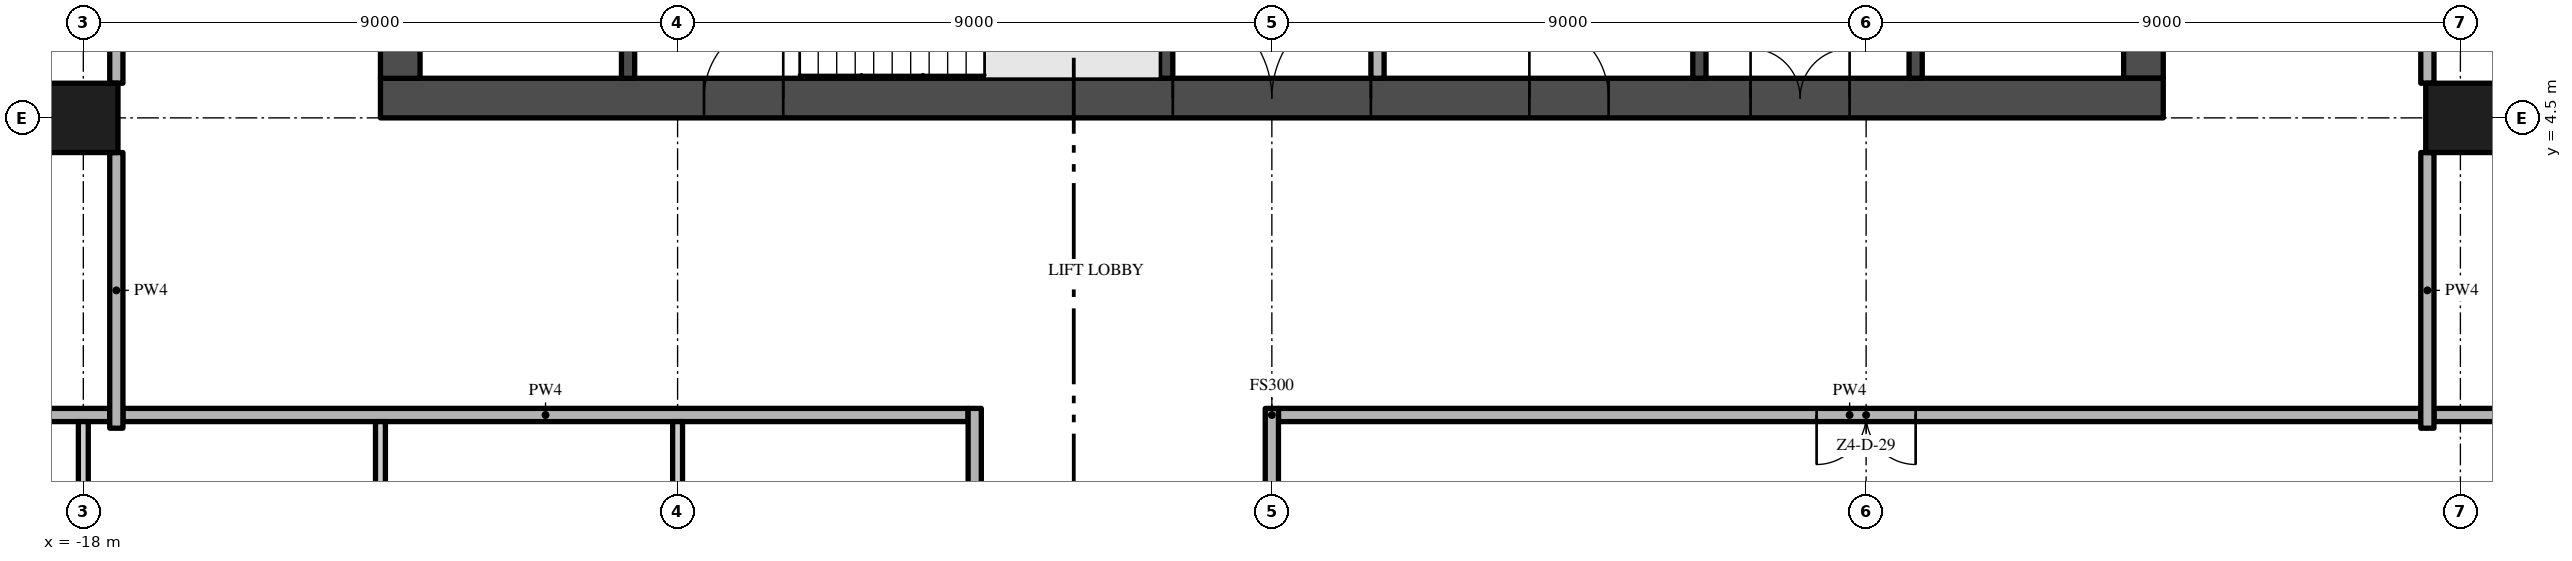
"""IFC4 building model, lengths in metres.
Left out: names, types, materials, properties, quantities, classifications, styles, units other than length and angle.
Written with IfcOpenShell. Run it as: python <this file> out.ifc"""

import sys

from ifc_helpers import new_model, si_unit, direction, frame, frame_2d, origin, origin_2d, place, context, subcontext, project, spatial, rectangle, extrude, element, fill, save


model = new_model("IFC4")
c1 = context("Model", 3, precision=1e-05, world=origin(), true_north=direction((0.0, 1.0)))
c2 = subcontext(c1, "Body", "Model", "MODEL_VIEW")
j1 = project(units=[si_unit("LENGTHUNIT", "METRE"), si_unit("PLANEANGLEUNIT", "RADIAN")], contexts=[c1])
p1 = place(None, origin())
s1 = spatial("IfcSite", under=j1, at=p1, CompositionType="ELEMENT")
p2 = place(p1, origin())
s2 = spatial("IfcBuilding", under=s1, at=p2, CompositionType="ELEMENT")
p3 = place(p2, frame((0.0, 0.0, 218.6)))
s3 = spatial("IfcBuildingStorey", under=s2, at=p3, CompositionType="ELEMENT", Elevation=218.6)
p4 = place(p3, frame((-13.5, 4.8, -0.3), z_axis=(0.0, 0.0, 1.0), x_axis=(1.0, 0.0, 0.0)))
e1 = element("IfcWall", 1, at=p4, inside=s3, PredefinedType="SHEAR", context=c2, shape_type="SweptSolid", body=[
    extrude(rectangle(XDim=27.0, YDim=0.6, at=frame_2d((13.5, 0.0))), origin(), (0.0, 0.0, 1.0), 3.8),
])
p5 = place(p4, frame((12.0, 0.0, 0.3)))
e2 = element("IfcOpeningElement", 2, at=p5, cuts=e1, PredefinedType="OPENING", context=c2, shape_type="SweptSolid", body=[
    extrude(rectangle(XDim=3.0, YDim=2.4, at=frame_2d((1.5, 1.2))), frame((0.0, 0.31, 0.0), z_axis=(0.0, -1.0, 0.0), x_axis=(1.0, 0.0, 0.0)), (0.0, 0.0, 1.0), 0.62),
])
p6 = place(p4, frame((4.9, 0.0, 0.3)))
e3 = element("IfcOpeningElement", 3, at=p6, cuts=e1, PredefinedType="OPENING", context=c2, shape_type="SweptSolid", body=[
    extrude(rectangle(XDim=1.2, YDim=2.2, at=frame_2d((0.6, 1.1))), frame((0.0, 0.31, 0.0), z_axis=(0.0, -1.0, 0.0), x_axis=(1.0, 0.0, 0.0)), (0.0, 0.0, 1.0), 0.62),
])
p7 = place(p4, frame((20.75, 0.0, 0.3)))
e4 = element("IfcOpeningElement", 4, at=p7, cuts=e1, PredefinedType="OPENING", context=c2, shape_type="SweptSolid", body=[
    extrude(rectangle(XDim=1.5, YDim=2.2, at=frame_2d((0.75, 1.1))), frame((0.0, 0.31, 0.0), z_axis=(0.0, -1.0, 0.0), x_axis=(1.0, 0.0, 0.0)), (0.0, 0.0, 1.0), 0.62),
])
p8 = place(p4, frame((17.4, 0.0, 0.3)))
e5 = element("IfcOpeningElement", 5, at=p8, cuts=e1, PredefinedType="OPENING", context=c2, shape_type="SweptSolid", body=[
    extrude(rectangle(XDim=1.2, YDim=2.2, at=frame_2d((0.6, 1.1))), frame((0.0, 0.31, 0.0), z_axis=(0.0, -1.0, 0.0), x_axis=(1.0, 0.0, 0.0)), (0.0, 0.0, 1.0), 0.62),
])
p9 = place(p3, frame((13.2, 5.1, -0.3), z_axis=(0.0, 0.0, 1.0), x_axis=(0.0, 1.0, 0.0)))
e6 = element("IfcWall", 6, at=p9, inside=s3, PredefinedType="SHEAR", context=c2, shape_type="SweptSolid", body=[
    extrude(rectangle(XDim=16.8, YDim=0.6, at=frame_2d((8.4, 0.0))), origin(), (0.0, 0.0, 1.0), 3.8),
])
p10 = place(p9, frame((6.3, 0.0, 0.3)))
e7 = element("IfcOpeningElement", 7, at=p10, cuts=e6, PredefinedType="OPENING", context=c2, shape_type="SweptSolid", body=[
    extrude(rectangle(XDim=1.2, YDim=2.2, at=frame_2d((0.6, 1.1))), frame((0.0, 0.31, 0.0), z_axis=(0.0, -1.0, 0.0), x_axis=(1.0, 0.0, 0.0)), (0.0, 0.0, 1.0), 0.62),
])
p11 = place(p3, frame((-13.2, 21.9, -0.3), z_axis=(0.0, 0.0, 1.0), x_axis=(0.0, -1.0, 0.0)))
e8 = element("IfcWall", 8, at=p11, inside=s3, PredefinedType="SHEAR", context=c2, shape_type="SweptSolid", body=[
    extrude(rectangle(XDim=16.8, YDim=0.6, at=frame_2d((8.4, 0.0))), origin(), (0.0, 0.0, 1.0), 3.8),
])
p12 = place(p11, frame((9.3, 0.0, 0.3)))
e9 = element("IfcOpeningElement", 9, at=p12, cuts=e8, PredefinedType="OPENING", context=c2, shape_type="SweptSolid", body=[
    extrude(rectangle(XDim=1.2, YDim=2.2, at=frame_2d((0.6, 1.1))), frame((0.0, 0.31, 0.0), z_axis=(0.0, -1.0, 0.0), x_axis=(1.0, 0.0, 0.0)), (0.0, 0.0, 1.0), 0.62),
])
for number, where, z_axis, x_axis in (
    (10, (-18.0, 4.5, 0.0), (0.0, 0.0, 1.0), (1.0, 0.0, 0.0)),
    (11, (18.0, 4.5, 0.0), (0.0, 0.0, 1.0), (1.0, 0.0, 0.0)),
):
    element("IfcColumn", number, at=place(p3, frame(where, z_axis=z_axis, x_axis=x_axis)), inside=s3, PredefinedType="COLUMN", context=c2, shape_type="SweptSolid", body=[
        extrude(rectangle(XDim=1.05, YDim=1.05, at=origin_2d()), origin(), (0.0, 0.0, 1.0), 3.5),
    ])
for number, where, z_axis, x_axis in (
    (12, (-9.75, 5.1, 0.0), (0.0, 0.0, 1.0), (0.0, 1.0, 0.0)),
    (13, (-1.6, 5.1, 0.0), (0.0, 0.0, 1.0), (0.0, 1.0, 0.0)),
):
    element("IfcWall", number, at=place(p3, frame(where, z_axis=z_axis, x_axis=x_axis)), inside=s3, PredefinedType="SHEAR", context=c2, shape_type="SweptSolid", body=[
        extrude(rectangle(XDim=2.85, YDim=0.2, at=frame_2d((1.425, 0.0))), origin(), (0.0, 0.0, 1.0), 3.5),
    ])
p13 = place(p3, frame((1.6, 7.5, 0.0), z_axis=(0.0, 0.0, 1.0), x_axis=(0.0, -1.0, 0.0)))
e14 = element("IfcWall", 14, at=p13, inside=s3, PredefinedType="PARTITIONING", context=c2, shape_type="SweptSolid", body=[
    extrude(rectangle(XDim=2.4, YDim=0.2, at=frame_2d((1.2, 0.0))), origin(), (0.0, 0.0, 1.0), 3.5),
])
p14 = place(p13, frame((0.35, 0.0, 0.0)))
e15 = element("IfcOpeningElement", 15, at=p14, cuts=e14, PredefinedType="OPENING", context=c2, shape_type="SweptSolid", body=[
    extrude(rectangle(XDim=0.9, YDim=2.1, at=frame_2d((0.45, 1.05))), frame((0.0, 0.11, 0.0), z_axis=(0.0, -1.0, 0.0), x_axis=(1.0, 0.0, 0.0)), (0.0, 0.0, 1.0), 0.22),
])
p15 = place(p3, frame((6.475, 5.1, 0.0), z_axis=(0.0, 0.0, 1.0), x_axis=(0.0, 1.0, 0.0)))
e16 = element("IfcWall", 16, at=p15, inside=s3, PredefinedType="SHEAR", context=c2, shape_type="SweptSolid", body=[
    extrude(rectangle(XDim=2.4, YDim=0.2, at=frame_2d((1.2, 0.0))), origin(), (0.0, 0.0, 1.0), 3.5),
])
p16 = place(p3, frame((9.75, 5.1, 0.0), z_axis=(0.0, 0.0, 1.0), x_axis=(0.0, 1.0, 0.0)))
e17 = element("IfcWall", 17, at=p16, inside=s3, PredefinedType="SHEAR", context=c2, shape_type="SweptSolid", body=[
    extrude(rectangle(XDim=2.5, YDim=0.2, at=frame_2d((1.25, 0.0))), origin(), (0.0, 0.0, 1.0), 3.5),
])
p17 = place(p16, frame((0.85, 0.0, 0.0)))
e18 = element("IfcOpeningElement", 18, at=p17, cuts=e17, PredefinedType="OPENING", context=c2, shape_type="SweptSolid", body=[
    extrude(rectangle(XDim=1.1, YDim=2.1, at=frame_2d((0.55, 1.05))), frame((0.0, 0.11, 0.0), z_axis=(0.0, -1.0, 0.0), x_axis=(1.0, 0.0, 0.0)), (0.0, 0.0, 1.0), 0.22),
])
p18 = place(p3, frame((-17.4, 0.0, 0.0), z_axis=(0.0, 0.0, 1.0), x_axis=(1.0, 0.0, 0.0)))
e19 = element("IfcWall", 19, at=p18, inside=s3, PredefinedType="PARTITIONING", context=c2, shape_type="SweptSolid", body=[
    extrude(rectangle(XDim=12.8, YDim=0.2, at=frame_2d((6.4, 0.0))), origin(), (0.0, 0.0, 1.0), 3.5),
])
p19 = place(p3, frame((17.4, 0.0, 0.0), z_axis=(0.0, 0.0, 1.0), x_axis=(-1.0, 0.0, 0.0)))
e20 = element("IfcWall", 20, at=p19, inside=s3, PredefinedType="PARTITIONING", context=c2, shape_type="SweptSolid", body=[
    extrude(rectangle(XDim=17.3, YDim=0.2, at=frame_2d((8.65, 0.0))), origin(), (0.0, 0.0, 1.0), 3.5),
])
p20 = place(p19, frame((7.65, 0.0, 0.0)))
e21 = element("IfcOpeningElement", 21, at=p20, cuts=e20, PredefinedType="OPENING", context=c2, shape_type="SweptSolid", body=[
    extrude(rectangle(XDim=1.5, YDim=2.4, at=frame_2d((0.75, 1.2))), frame((0.0, 0.11, 0.0), z_axis=(0.0, -1.0, 0.0), x_axis=(1.0, 0.0, 0.0)), (0.0, 0.0, 1.0), 0.22),
])
for number, where, z_axis, x_axis in (
    (22, (-26.7, 0.0, 0.0), (0.0, 0.0, 1.0), (1.0, 0.0, 0.0)),
    (23, (17.6, 0.0, 0.0), (0.0, 0.0, 1.0), (1.0, 0.0, 0.0)),
):
    element("IfcWall", number, at=place(p3, frame(where, z_axis=z_axis, x_axis=x_axis)), inside=s3, PredefinedType="PARTITIONING", context=c2, shape_type="SweptSolid", body=[
        extrude(rectangle(XDim=9.1, YDim=0.2, at=frame_2d((4.55, 0.0))), origin(), (0.0, 0.0, 1.0), 3.5),
    ])
p21 = place(p3, frame((-18.0, -3.975, 0.0), z_axis=(0.0, 0.0, 1.0), x_axis=(0.0, 1.0, 0.0)))
e24 = element("IfcWall", 24, at=p21, inside=s3, PredefinedType="PARTITIONING", context=c2, shape_type="SweptSolid", body=[
    extrude(rectangle(XDim=3.875, YDim=0.15, at=frame_2d((1.938, 0.0))), origin(), (0.0, 0.0, 1.0), 3.5),
])
p22 = place(p21, frame((1.0, 0.0, 0.0)))
e25 = element("IfcOpeningElement", 25, at=p22, cuts=e24, PredefinedType="OPENING", context=c2, shape_type="SweptSolid", body=[
    extrude(rectangle(XDim=1.5, YDim=2.4, at=frame_2d((0.75, 1.2))), frame((0.0, 0.085, 0.0), z_axis=(0.0, -1.0, 0.0), x_axis=(1.0, 0.0, 0.0)), (0.0, 0.0, 1.0), 0.17),
])
p23 = place(p3, frame((-17.5, -0.2, 0.0), z_axis=(0.0, 0.0, 1.0), x_axis=(0.0, 1.0, 0.0)))
e26 = element("IfcWall", 26, at=p23, inside=s3, PredefinedType="PARTITIONING", context=c2, shape_type="SweptSolid", body=[
    extrude(rectangle(XDim=4.175, YDim=0.2, at=frame_2d((2.087, 0.0))), origin(), (0.0, 0.0, 1.0), 3.5),
])
p24 = place(p3, frame((-17.5, 5.025, 0.0), z_axis=(0.0, 0.0, 1.0), x_axis=(0.0, 1.0, 0.0)))
e27 = element("IfcWall", 27, at=p24, inside=s3, PredefinedType="PARTITIONING", context=c2, shape_type="SweptSolid", body=[
    extrude(rectangle(XDim=7.95, YDim=0.2, at=frame_2d((3.975, 0.0))), origin(), (0.0, 0.0, 1.0), 3.5),
])
p25 = place(p3, frame((-13.5, -0.1, 0.0), z_axis=(0.0, 0.0, 1.0), x_axis=(0.0, -1.0, 0.0)))
e28 = element("IfcWall", 28, at=p25, inside=s3, PredefinedType="PARTITIONING", context=c2, shape_type="SweptSolid", body=[
    extrude(rectangle(XDim=8.525, YDim=0.15, at=frame_2d((4.263, 0.0))), origin(), (0.0, 0.0, 1.0), 3.5),
])
p26 = place(p25, frame((4.0, 0.0, 0.0)))
e29 = element("IfcOpeningElement", 29, at=p26, cuts=e28, PredefinedType="OPENING", context=c2, shape_type="SweptSolid", body=[
    extrude(rectangle(XDim=0.8, YDim=2.0, at=frame_2d((0.4, 1.0))), frame((0.0, 0.085, 0.0), z_axis=(0.0, -1.0, 0.0), x_axis=(1.0, 0.0, 0.0)), (0.0, 0.0, 1.0), 0.17),
])
p27 = place(p3, frame((-9.0, -3.975, 0.0), z_axis=(0.0, 0.0, 1.0), x_axis=(0.0, 1.0, 0.0)))
e30 = element("IfcWall", 30, at=p27, inside=s3, PredefinedType="PARTITIONING", context=c2, shape_type="SweptSolid", body=[
    extrude(rectangle(XDim=3.875, YDim=0.15, at=frame_2d((1.938, 0.0))), origin(), (0.0, 0.0, 1.0), 3.5),
])
p28 = place(p27, frame((2.025, 0.0, 0.0)))
e31 = element("IfcOpeningElement", 31, at=p28, cuts=e30, PredefinedType="OPENING", context=c2, shape_type="SweptSolid", body=[
    extrude(rectangle(XDim=0.9, YDim=2.1, at=frame_2d((0.45, 1.05))), frame((0.0, 0.085, 0.0), z_axis=(0.0, -1.0, 0.0), x_axis=(1.0, 0.0, 0.0)), (0.0, 0.0, 1.0), 0.17),
])
p29 = place(p3, frame((-4.5, -22.2, 0.0), z_axis=(0.0, 0.0, 1.0), x_axis=(0.0, 1.0, 0.0)))
e32 = element("IfcWall", 32, at=p29, inside=s3, PredefinedType="PARTITIONING", context=c2, shape_type="SweptSolid", body=[
    extrude(rectangle(XDim=22.3, YDim=0.2, at=frame_2d((11.15, 0.0))), origin(), (0.0, 0.0, 1.0), 3.5),
])
p30 = place(p29, frame((10.2, 0.0, 0.0)))
e33 = element("IfcOpeningElement", 33, at=p30, cuts=e32, PredefinedType="OPENING", context=c2, shape_type="SweptSolid", body=[
    extrude(rectangle(XDim=1.5, YDim=2.4, at=frame_2d((0.75, 1.2))), frame((0.0, 0.11, 0.0), z_axis=(0.0, -1.0, 0.0), x_axis=(1.0, 0.0, 0.0)), (0.0, 0.0, 1.0), 0.22),
])
p31 = place(p3, frame((0.0, -3.975, 0.0), z_axis=(0.0, 0.0, 1.0), x_axis=(0.0, 1.0, 0.0)))
e34 = element("IfcWall", 34, at=p31, inside=s3, PredefinedType="PARTITIONING", context=c2, shape_type="SweptSolid", body=[
    extrude(rectangle(XDim=4.075, YDim=0.2, at=frame_2d((2.038, 0.0))), origin(), (0.0, 0.0, 1.0), 3.5),
])
p32 = place(p3, frame((17.5, -0.2, 0.0), z_axis=(0.0, 0.0, 1.0), x_axis=(0.0, 1.0, 0.0)))
e35 = element("IfcWall", 35, at=p32, inside=s3, PredefinedType="PARTITIONING", context=c2, shape_type="SweptSolid", body=[
    extrude(rectangle(XDim=4.175, YDim=0.2, at=frame_2d((2.087, 0.0))), origin(), (0.0, 0.0, 1.0), 3.5),
])
p33 = place(p3, frame((17.5, 5.025, 0.0), z_axis=(0.0, 0.0, 1.0), x_axis=(0.0, 1.0, 0.0)))
e36 = element("IfcWall", 36, at=p33, inside=s3, PredefinedType="PARTITIONING", context=c2, shape_type="SweptSolid", body=[
    extrude(rectangle(XDim=7.95, YDim=0.2, at=frame_2d((3.975, 0.0))), origin(), (0.0, 0.0, 1.0), 3.5),
])
p34 = place(p5, frame((3.0, 0.0, 0.0), z_axis=(0.0, 0.0, 1.0), x_axis=(-1.0, 0.0, 0.0)))
e37 = element("IfcDoor", 37, at=p34, inside=s3, OperationType="DOUBLE_DOOR_SINGLE_SWING", PredefinedType="DOOR", context=c2, shape_type="SweptSolid", body=[
    extrude(rectangle(XDim=3.0, YDim=2.4, at=frame_2d((1.5, 1.2))), frame((0.0, 0.025, 0.0), z_axis=(0.0, -1.0, 0.0), x_axis=(1.0, 0.0, 0.0)), (0.0, 0.0, 1.0), 0.05),
])
fill(e2, e37)
p35 = place(p6, frame((1.2, 0.0, 0.0), z_axis=(0.0, 0.0, 1.0), x_axis=(-1.0, 0.0, 0.0)))
e38 = element("IfcDoor", 38, at=p35, inside=s3, OperationType="SINGLE_SWING_LEFT", PredefinedType="DOOR", context=c2, shape_type="SweptSolid", body=[
    extrude(rectangle(XDim=1.2, YDim=2.2, at=frame_2d((0.6, 1.1))), frame((0.0, 0.025, 0.0), z_axis=(0.0, -1.0, 0.0), x_axis=(1.0, 0.0, 0.0)), (0.0, 0.0, 1.0), 0.05),
])
fill(e3, e38)
p36 = place(p7, frame((1.5, 0.0, 0.0), z_axis=(0.0, 0.0, 1.0), x_axis=(-1.0, 0.0, 0.0)))
e39 = element("IfcDoor", 39, at=p36, inside=s3, OperationType="DOUBLE_DOOR_SINGLE_SWING", PredefinedType="DOOR", context=c2, shape_type="SweptSolid", body=[
    extrude(rectangle(XDim=1.5, YDim=2.2, at=frame_2d((0.75, 1.1))), frame((0.0, 0.025, 0.0), z_axis=(0.0, -1.0, 0.0), x_axis=(1.0, 0.0, 0.0)), (0.0, 0.0, 1.0), 0.05),
])
fill(e4, e39)
p37 = place(p8, frame((1.2, 0.0, 0.0), z_axis=(0.0, 0.0, 1.0), x_axis=(-1.0, 0.0, 0.0)))
e40 = element("IfcDoor", 40, at=p37, inside=s3, OperationType="SINGLE_SWING_RIGHT", PredefinedType="DOOR", context=c2, shape_type="SweptSolid", body=[
    extrude(rectangle(XDim=1.2, YDim=2.2, at=frame_2d((0.6, 1.1))), frame((0.0, 0.025, 0.0), z_axis=(0.0, -1.0, 0.0), x_axis=(1.0, 0.0, 0.0)), (0.0, 0.0, 1.0), 0.05),
])
fill(e5, e40)
p38 = place(p20, origin())
e41 = element("IfcDoor", 41, at=p38, inside=s3, OperationType="DOUBLE_DOOR_SINGLE_SWING", PredefinedType="DOOR", context=c2, shape_type="SweptSolid", body=[
    extrude(rectangle(XDim=1.5, YDim=2.4, at=frame_2d((0.75, 1.2))), frame((0.0, 0.025, 0.0), z_axis=(0.0, -1.0, 0.0), x_axis=(1.0, 0.0, 0.0)), (0.0, 0.0, 1.0), 0.05),
])
fill(e21, e41)
save(model, sys.argv[1])
